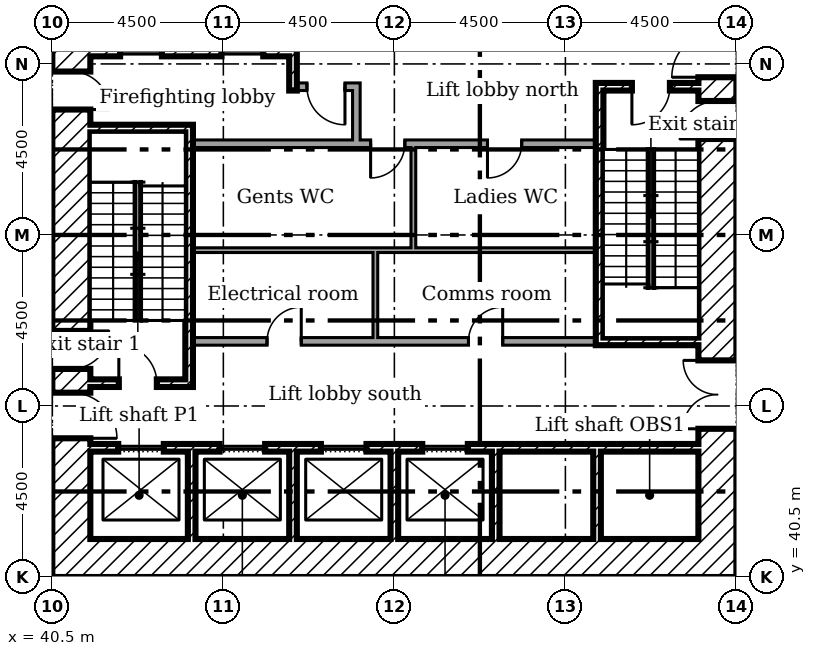
"""IFC4 building model, lengths in metres.
Left out: names, types, materials, properties, quantities, classifications, styles, units other than length and angle.
Written with IfcOpenShell. Run it as: python <this file> out.ifc"""

import sys

from ifc_helpers import new_model, si_unit, direction, frame, frame_2d, origin, place, context, subcontext, project, spatial, rectangle, extrude, element, fill, save


model = new_model("IFC4")
c1 = context("Model", 3, precision=1e-05, world=origin(), true_north=direction((0.0, 1.0)))
c2 = subcontext(c1, "Body", "Model", "MODEL_VIEW")
j1 = project(units=[si_unit("LENGTHUNIT", "METRE"), si_unit("PLANEANGLEUNIT", "RADIAN")], contexts=[c1])
p1 = place(None, origin())
s1 = spatial("IfcSite", under=j1, at=p1, CompositionType="ELEMENT")
p2 = place(p1, origin())
s2 = spatial("IfcBuilding", under=s1, at=p2, CompositionType="ELEMENT")
p3 = place(p2, frame((0.0, 0.0, 11.5)))
s3 = spatial("IfcBuildingStorey", under=s2, at=p3, CompositionType="ELEMENT", Elevation=11.5)
p4 = place(p3, frame((58.0, 40.5, 0.0), z_axis=(0.0, 0.0, 1.0), x_axis=(0.0, 1.0, 0.0)))
e1 = element("IfcWall", 1, at=p4, inside=s3, PredefinedType="SHEAR", context=c2, shape_type="SweptSolid", body=[
    extrude(rectangle(XDim=18.0, YDim=1.0, at=frame_2d((9.0, 0.0))), origin(), (0.0, 0.0, 1.0), 4.5),
])
p5 = place(p4, frame((13.15, 0.0, 0.0)))
e2 = element("IfcOpeningElement", 2, at=p5, cuts=e1, PredefinedType="OPENING", context=c2, shape_type="SweptSolid", body=[
    extrude(rectangle(XDim=1.2, YDim=2.1, at=frame_2d((0.6, 1.05))), frame((0.0, 0.51, 0.0), z_axis=(0.0, -1.0, 0.0), x_axis=(1.0, 0.0, 0.0)), (0.0, 0.0, 1.0), 1.02),
])
p6 = place(p4, frame((3.9, 0.0, 0.0)))
e3 = element("IfcOpeningElement", 3, at=p6, cuts=e1, PredefinedType="OPENING", context=c2, shape_type="SweptSolid", body=[
    extrude(rectangle(XDim=1.8, YDim=2.1, at=frame_2d((0.9, 1.05))), frame((0.0, 0.51, 0.0), z_axis=(0.0, -1.0, 0.0), x_axis=(1.0, 0.0, 0.0)), (0.0, 0.0, 1.0), 1.02),
])
p7 = place(p4, frame((11.525, 0.0, 0.0)))
e4 = element("IfcOpeningElement", 4, at=p7, cuts=e1, PredefinedType="OPENING", context=c2, shape_type="SweptSolid", body=[
    extrude(rectangle(XDim=1.0, YDim=2.1, at=frame_2d((0.5, 1.05))), frame((0.0, 0.51, 0.0), z_axis=(0.0, -1.0, 0.0), x_axis=(1.0, 0.0, 0.0)), (0.0, 0.0, 1.0), 1.02),
])
p8 = place(p3, frame((41.5, 41.0, 0.0)))
e5 = element("IfcWall", 5, at=p8, inside=s3, PredefinedType="SHEAR", context=c2, shape_type="SweptSolid", body=[
    extrude(rectangle(XDim=16.0, YDim=1.0, at=frame_2d((8.0, 0.0))), origin(), (0.0, 0.0, 1.0), 4.5),
])
p9 = place(p3, frame((41.0, 40.5, 0.0), z_axis=(0.0, 0.0, 1.0), x_axis=(0.0, 1.0, 0.0)))
e6 = element("IfcWall", 6, at=p9, inside=s3, PredefinedType="SHEAR", context=c2, shape_type="SweptSolid", body=[
    extrude(rectangle(XDim=18.0, YDim=1.0, at=frame_2d((9.0, 0.0))), origin(), (0.0, 0.0, 1.0), 4.5),
])
p10 = place(p9, frame((3.65, 0.0, 0.0)))
e7 = element("IfcOpeningElement", 7, at=p10, cuts=e6, PredefinedType="OPENING", context=c2, shape_type="SweptSolid", body=[
    extrude(rectangle(XDim=1.2, YDim=2.1, at=frame_2d((0.6, 1.05))), frame((0.0, 0.51, 0.0), z_axis=(0.0, -1.0, 0.0), x_axis=(1.0, 0.0, 0.0)), (0.0, 0.0, 1.0), 1.02),
])
p11 = place(p9, frame((5.475, 0.0, 0.0)))
e8 = element("IfcOpeningElement", 8, at=p11, cuts=e6, PredefinedType="OPENING", context=c2, shape_type="SweptSolid", body=[
    extrude(rectangle(XDim=1.0, YDim=2.1, at=frame_2d((0.5, 1.05))), frame((0.0, 0.51, 0.0), z_axis=(0.0, -1.0, 0.0), x_axis=(1.0, 0.0, 0.0)), (0.0, 0.0, 1.0), 1.02),
])
p12 = place(p9, frame((12.3, 0.0, 0.0)))
e9 = element("IfcOpeningElement", 9, at=p12, cuts=e6, PredefinedType="OPENING", context=c2, shape_type="SweptSolid", body=[
    extrude(rectangle(XDim=1.0, YDim=2.1, at=frame_2d((0.5, 1.05))), frame((0.0, 0.51, 0.0), z_axis=(0.0, -1.0, 0.0), x_axis=(1.0, 0.0, 0.0)), (0.0, 0.0, 1.0), 1.02),
])
p13 = place(p3, frame((46.833, 57.5, 0.0), z_axis=(0.0, 0.0, 1.0), x_axis=(0.0, -1.0, 0.0)))
e10 = element("IfcWall", 10, at=p13, inside=s3, PredefinedType="SHEAR", context=c2, shape_type="SweptSolid", body=[
    extrude(rectangle(XDim=4.2, YDim=0.2, at=frame_2d((2.1, 0.0))), origin(), (0.0, 0.0, 1.0), 4.5),
])
for number, where, z_axis, x_axis in (
    (11, (44.167, 41.5, 0.0), (0.0, 0.0, 1.0), (0.0, 1.0, 0.0)),
    (12, (46.833, 41.5, 0.0), (0.0, 0.0, 1.0), (0.0, 1.0, 0.0)),
    (13, (49.5, 41.5, 0.0), (0.0, 0.0, 1.0), (0.0, 1.0, 0.0)),
    (14, (52.167, 41.5, 0.0), (0.0, 0.0, 1.0), (0.0, 1.0, 0.0)),
    (15, (54.833, 41.5, 0.0), (0.0, 0.0, 1.0), (0.0, 1.0, 0.0)),
):
    element("IfcWall", number, at=place(p3, frame(where, z_axis=z_axis, x_axis=x_axis)), inside=s3, PredefinedType="SHEAR", context=c2, shape_type="SweptSolid", body=[
        extrude(rectangle(XDim=2.3, YDim=0.2, at=frame_2d((1.15, 0.0))), origin(), (0.0, 0.0, 1.0), 4.5),
    ])
p14 = place(p3, frame((48.5, 51.9, 0.0), z_axis=(0.0, 0.0, 1.0), x_axis=(0.0, 1.0, 0.0)))
e16 = element("IfcWall", 16, at=p14, inside=s3, PredefinedType="PARTITIONING", context=c2, shape_type="SweptSolid", body=[
    extrude(rectangle(XDim=1.6, YDim=0.2, at=frame_2d((0.8, 0.0))), origin(), (0.0, 0.0, 1.0), 4.5),
])
p15 = place(p3, frame((46.933, 53.4, 0.0)))
e17 = element("IfcWall", 17, at=p15, inside=s3, PredefinedType="PARTITIONING", context=c2, shape_type="SweptSolid", body=[
    extrude(rectangle(XDim=1.467, YDim=0.2, at=frame_2d((0.733, 0.0))), origin(), (0.0, 0.0, 1.0), 4.5),
])
p16 = place(p15, frame((0.267, 0.0, 0.0)))
e18 = element("IfcOpeningElement", 18, at=p16, cuts=e17, PredefinedType="OPENING", context=c2, shape_type="SweptSolid", body=[
    extrude(rectangle(XDim=1.0, YDim=2.1, at=frame_2d((0.5, 1.05))), frame((0.0, 0.11, 0.0), z_axis=(0.0, -1.0, 0.0), x_axis=(1.0, 0.0, 0.0)), (0.0, 0.0, 1.0), 0.22),
])
p17 = place(p3, frame((41.5, 54.3, 0.0)))
e19 = element("IfcWall", 19, at=p17, inside=s3, PredefinedType="SHEAR", context=c2, shape_type="SweptSolid", body=[
    extrude(rectangle(XDim=5.233, YDim=0.2, at=frame_2d((2.617, 0.0))), origin(), (0.0, 0.0, 1.0), 4.5),
])
p18 = place(p17, frame((0.783, 0.0, 0.0)))
e20 = element("IfcOpeningElement", 20, at=p18, cuts=e19, PredefinedType="OPENING", context=c2, shape_type="SweptSolid", body=[
    extrude(rectangle(XDim=1.1, YDim=2.1, at=frame_2d((0.55, 1.05))), frame((0.0, 0.11, 0.0), z_axis=(0.0, -1.0, 0.0), x_axis=(1.0, 0.0, 0.0)), (0.0, 0.0, 1.0), 0.22),
])
p19 = place(p17, frame((3.45, 0.0, 0.0)))
e21 = element("IfcOpeningElement", 21, at=p19, cuts=e19, PredefinedType="OPENING", context=c2, shape_type="SweptSolid", body=[
    extrude(rectangle(XDim=1.1, YDim=2.1, at=frame_2d((0.55, 1.05))), frame((0.0, 0.11, 0.0), z_axis=(0.0, -1.0, 0.0), x_axis=(1.0, 0.0, 0.0)), (0.0, 0.0, 1.0), 0.22),
])
p20 = place(p3, frame((41.5, 43.9, 0.0)))
e22 = element("IfcWall", 22, at=p20, inside=s3, PredefinedType="SHEAR", context=c2, shape_type="SweptSolid", body=[
    extrude(rectangle(XDim=16.0, YDim=0.2, at=frame_2d((8.0, 0.0))), origin(), (0.0, 0.0, 1.0), 4.5),
])
p21 = place(p20, frame((0.733, 0.0, 0.0)))
e23 = element("IfcOpeningElement", 23, at=p21, cuts=e22, PredefinedType="OPENING", context=c2, shape_type="SweptSolid", body=[
    extrude(rectangle(XDim=1.2, YDim=2.1, at=frame_2d((0.6, 1.05))), frame((0.0, 0.11, 0.0), z_axis=(0.0, -1.0, 0.0), x_axis=(1.0, 0.0, 0.0)), (0.0, 0.0, 1.0), 0.22),
])
p22 = place(p20, frame((3.4, 0.0, 0.0)))
e24 = element("IfcOpeningElement", 24, at=p22, cuts=e22, PredefinedType="OPENING", context=c2, shape_type="SweptSolid", body=[
    extrude(rectangle(XDim=1.2, YDim=2.1, at=frame_2d((0.6, 1.05))), frame((0.0, 0.11, 0.0), z_axis=(0.0, -1.0, 0.0), x_axis=(1.0, 0.0, 0.0)), (0.0, 0.0, 1.0), 0.22),
])
p23 = place(p20, frame((6.067, 0.0, 0.0)))
e25 = element("IfcOpeningElement", 25, at=p23, cuts=e22, PredefinedType="OPENING", context=c2, shape_type="SweptSolid", body=[
    extrude(rectangle(XDim=1.2, YDim=2.1, at=frame_2d((0.6, 1.05))), frame((0.0, 0.11, 0.0), z_axis=(0.0, -1.0, 0.0), x_axis=(1.0, 0.0, 0.0)), (0.0, 0.0, 1.0), 0.22),
])
p24 = place(p20, frame((8.733, 0.0, 0.0)))
e26 = element("IfcOpeningElement", 26, at=p24, cuts=e22, PredefinedType="OPENING", context=c2, shape_type="SweptSolid", body=[
    extrude(rectangle(XDim=1.2, YDim=2.1, at=frame_2d((0.6, 1.05))), frame((0.0, 0.11, 0.0), z_axis=(0.0, -1.0, 0.0), x_axis=(1.0, 0.0, 0.0)), (0.0, 0.0, 1.0), 0.22),
])
p25 = place(p3, frame((44.1, 45.5, 0.0), z_axis=(0.0, 0.0, 1.0), x_axis=(0.0, 1.0, 0.0)))
e27 = element("IfcWall", 27, at=p25, inside=s3, PredefinedType="SHEAR", context=c2, shape_type="SweptSolid", body=[
    extrude(rectangle(XDim=6.9, YDim=0.2, at=frame_2d((3.45, 0.0))), origin(), (0.0, 0.0, 1.0), 4.5),
])
p26 = place(p3, frame((41.5, 52.3, 0.0)))
e28 = element("IfcWall", 28, at=p26, inside=s3, PredefinedType="SHEAR", context=c2, shape_type="SweptSolid", body=[
    extrude(rectangle(XDim=2.5, YDim=0.2, at=frame_2d((1.25, 0.0))), origin(), (0.0, 0.0, 1.0), 4.5),
])
p27 = place(p3, frame((41.5, 45.6, 0.0)))
e29 = element("IfcWall", 29, at=p27, inside=s3, PredefinedType="SHEAR", context=c2, shape_type="SweptSolid", body=[
    extrude(rectangle(XDim=2.5, YDim=0.2, at=frame_2d((1.25, 0.0))), origin(), (0.0, 0.0, 1.0), 4.5),
])
p28 = place(p27, frame((0.75, 0.0, 0.0)))
e30 = element("IfcOpeningElement", 30, at=p28, cuts=e29, PredefinedType="OPENING", context=c2, shape_type="SweptSolid", body=[
    extrude(rectangle(XDim=1.0, YDim=2.1, at=frame_2d((0.5, 1.05))), frame((0.0, 0.11, 0.0), z_axis=(0.0, -1.0, 0.0), x_axis=(1.0, 0.0, 0.0)), (0.0, 0.0, 1.0), 0.22),
])
p29 = place(p3, frame((54.8, 53.4, 0.0)))
e31 = element("IfcWall", 31, at=p29, inside=s3, PredefinedType="SHEAR", context=c2, shape_type="SweptSolid", body=[
    extrude(rectangle(XDim=2.7, YDim=0.2, at=frame_2d((1.35, 0.0))), origin(), (0.0, 0.0, 1.0), 4.5),
])
p30 = place(p29, frame((0.95, 0.0, 0.0)))
e32 = element("IfcOpeningElement", 32, at=p30, cuts=e31, PredefinedType="OPENING", context=c2, shape_type="SweptSolid", body=[
    extrude(rectangle(XDim=1.0, YDim=2.1, at=frame_2d((0.5, 1.05))), frame((0.0, 0.11, 0.0), z_axis=(0.0, -1.0, 0.0), x_axis=(1.0, 0.0, 0.0)), (0.0, 0.0, 1.0), 0.22),
])
p31 = place(p3, frame((54.8, 46.7, 0.0)))
e33 = element("IfcWall", 33, at=p31, inside=s3, PredefinedType="SHEAR", context=c2, shape_type="SweptSolid", body=[
    extrude(rectangle(XDim=2.7, YDim=0.2, at=frame_2d((1.35, 0.0))), origin(), (0.0, 0.0, 1.0), 4.5),
])
p32 = place(p3, frame((54.9, 46.8, 0.0), z_axis=(0.0, 0.0, 1.0), x_axis=(0.0, 1.0, 0.0)))
e34 = element("IfcWall", 34, at=p32, inside=s3, PredefinedType="SHEAR", context=c2, shape_type="SweptSolid", body=[
    extrude(rectangle(XDim=6.5, YDim=0.2, at=frame_2d((3.25, 0.0))), origin(), (0.0, 0.0, 1.0), 4.5),
])
p33 = place(p3, frame((44.2, 51.9, 0.0)))
e35 = element("IfcWall", 35, at=p33, inside=s3, PredefinedType="PARTITIONING", context=c2, shape_type="SweptSolid", body=[
    extrude(rectangle(XDim=10.6, YDim=0.2, at=frame_2d((5.3, 0.0))), origin(), (0.0, 0.0, 1.0), 4.5),
])
p34 = place(p33, frame((4.675, 0.0, 0.0)))
e36 = element("IfcOpeningElement", 36, at=p34, cuts=e35, PredefinedType="OPENING", context=c2, shape_type="SweptSolid", body=[
    extrude(rectangle(XDim=0.9, YDim=2.1, at=frame_2d((0.45, 1.05))), frame((0.0, 0.11, 0.0), z_axis=(0.0, -1.0, 0.0), x_axis=(1.0, 0.0, 0.0)), (0.0, 0.0, 1.0), 0.22),
])
p35 = place(p33, frame((7.75, 0.0, 0.0)))
e37 = element("IfcOpeningElement", 37, at=p35, cuts=e35, PredefinedType="OPENING", context=c2, shape_type="SweptSolid", body=[
    extrude(rectangle(XDim=0.9, YDim=2.1, at=frame_2d((0.45, 1.05))), frame((0.0, 0.11, 0.0), z_axis=(0.0, -1.0, 0.0), x_axis=(1.0, 0.0, 0.0)), (0.0, 0.0, 1.0), 0.22),
])
p36 = place(p3, frame((44.2, 46.7, 0.0)))
e38 = element("IfcWall", 38, at=p36, inside=s3, PredefinedType="PARTITIONING", context=c2, shape_type="SweptSolid", body=[
    extrude(rectangle(XDim=10.6, YDim=0.2, at=frame_2d((5.3, 0.0))), origin(), (0.0, 0.0, 1.0), 4.5),
])
p37 = place(p36, frame((1.95, 0.0, 0.0)))
e39 = element("IfcOpeningElement", 39, at=p37, cuts=e38, PredefinedType="OPENING", context=c2, shape_type="SweptSolid", body=[
    extrude(rectangle(XDim=0.9, YDim=2.1, at=frame_2d((0.45, 1.05))), frame((0.0, 0.11, 0.0), z_axis=(0.0, -1.0, 0.0), x_axis=(1.0, 0.0, 0.0)), (0.0, 0.0, 1.0), 0.22),
])
p38 = place(p36, frame((7.25, 0.0, 0.0)))
e40 = element("IfcOpeningElement", 40, at=p38, cuts=e38, PredefinedType="OPENING", context=c2, shape_type="SweptSolid", body=[
    extrude(rectangle(XDim=0.9, YDim=2.1, at=frame_2d((0.45, 1.05))), frame((0.0, 0.11, 0.0), z_axis=(0.0, -1.0, 0.0), x_axis=(1.0, 0.0, 0.0)), (0.0, 0.0, 1.0), 0.22),
])
p39 = place(p3, frame((49.0, 46.8, 0.0), z_axis=(0.0, 0.0, 1.0), x_axis=(0.0, 1.0, 0.0)))
e41 = element("IfcWall", 41, at=p39, inside=s3, PredefinedType="PARTITIONING", context=c2, shape_type="SweptSolid", body=[
    extrude(rectangle(XDim=2.363, YDim=0.125, at=frame_2d((1.181, 0.0))), origin(), (0.0, 0.0, 1.0), 4.5),
])
p40 = place(p3, frame((48.938, 49.1, 0.0), z_axis=(0.0, 0.0, 1.0), x_axis=(-1.0, 0.0, 0.0)))
e42 = element("IfcWall", 42, at=p40, inside=s3, PredefinedType="PARTITIONING", context=c2, shape_type="SweptSolid", body=[
    extrude(rectangle(XDim=4.738, YDim=0.125, at=frame_2d((2.369, 0.0))), origin(), (0.0, 0.0, 1.0), 4.5),
])
p41 = place(p3, frame((50.062, 49.1, 0.0), z_axis=(0.0, 0.0, 1.0), x_axis=(-1.0, 0.0, 0.0)))
e43 = element("IfcWall", 43, at=p41, inside=s3, PredefinedType="PARTITIONING", context=c2, shape_type="SweptSolid", body=[
    extrude(rectangle(XDim=1.062, YDim=0.125, at=frame_2d((0.531, 0.0))), origin(), (0.0, 0.0, 1.0), 4.5),
])
p42 = place(p3, frame((54.8, 49.1, 0.0), z_axis=(0.0, 0.0, 1.0), x_axis=(-1.0, 0.0, 0.0)))
e44 = element("IfcWall", 44, at=p42, inside=s3, PredefinedType="PARTITIONING", context=c2, shape_type="SweptSolid", body=[
    extrude(rectangle(XDim=4.8, YDim=0.125, at=frame_2d((2.4, 0.0))), origin(), (0.0, 0.0, 1.0), 4.5),
])
p43 = place(p3, frame((50.0, 49.163, 0.0), z_axis=(0.0, 0.0, 1.0), x_axis=(0.0, 1.0, 0.0)))
e45 = element("IfcWall", 45, at=p43, inside=s3, PredefinedType="PARTITIONING", context=c2, shape_type="SweptSolid", body=[
    extrude(rectangle(XDim=2.637, YDim=0.125, at=frame_2d((1.319, 0.0))), origin(), (0.0, 0.0, 1.0), 4.5),
])
p44 = place(p5, origin())
e46 = element("IfcDoor", 46, at=p44, inside=s3, OperationType="SINGLE_SWING_RIGHT", PredefinedType="DOOR", context=c2, shape_type="SweptSolid", body=[
    extrude(rectangle(XDim=1.2, YDim=2.1, at=frame_2d((0.6, 1.05))), frame((0.0, 0.025, 0.0), z_axis=(0.0, -1.0, 0.0), x_axis=(1.0, 0.0, 0.0)), (0.0, 0.0, 1.0), 0.05),
])
fill(e2, e46)
p45 = place(p6, origin())
e47 = element("IfcDoor", 47, at=p45, inside=s3, OperationType="DOUBLE_DOOR_SINGLE_SWING", PredefinedType="DOOR", context=c2, shape_type="SweptSolid", body=[
    extrude(rectangle(XDim=1.8, YDim=2.1, at=frame_2d((0.9, 1.05))), frame((0.0, 0.025, 0.0), z_axis=(0.0, -1.0, 0.0), x_axis=(1.0, 0.0, 0.0)), (0.0, 0.0, 1.0), 0.05),
])
fill(e3, e47)
p46 = place(p10, frame((1.2, 0.0, 0.0), x_axis=(-1.0, 0.0, 0.0)))
e48 = element("IfcDoor", 48, at=p46, inside=s3, OperationType="SINGLE_SWING_LEFT", PredefinedType="DOOR", context=c2, shape_type="SweptSolid", body=[
    extrude(rectangle(XDim=1.2, YDim=2.1, at=frame_2d((0.6, 1.05))), frame((0.0, 0.025, 0.0), z_axis=(0.0, -1.0, 0.0), x_axis=(1.0, 0.0, 0.0)), (0.0, 0.0, 1.0), 0.05),
])
fill(e7, e48)
p47 = place(p28, origin())
e49 = element("IfcDoor", 49, at=p47, inside=s3, OperationType="SINGLE_SWING_RIGHT", PredefinedType="DOOR", context=c2, shape_type="SweptSolid", body=[
    extrude(rectangle(XDim=1.0, YDim=2.1, at=frame_2d((0.5, 1.05))), frame((0.0, 0.025, 0.0), z_axis=(0.0, -1.0, 0.0), x_axis=(1.0, 0.0, 0.0)), (0.0, 0.0, 1.0), 0.05),
])
fill(e30, e49)
p48 = place(p11, frame((1.0, 0.0, 0.0), x_axis=(-1.0, 0.0, 0.0)))
e50 = element("IfcDoor", 50, at=p48, inside=s3, OperationType="SINGLE_SWING_RIGHT", PredefinedType="DOOR", context=c2, shape_type="SweptSolid", body=[
    extrude(rectangle(XDim=1.0, YDim=2.1, at=frame_2d((0.5, 1.05))), frame((0.0, 0.025, 0.0), z_axis=(0.0, -1.0, 0.0), x_axis=(1.0, 0.0, 0.0)), (0.0, 0.0, 1.0), 0.05),
])
fill(e8, e50)
p49 = place(p30, frame((1.0, 0.0, 0.0), x_axis=(-1.0, 0.0, 0.0)))
e51 = element("IfcDoor", 51, at=p49, inside=s3, OperationType="SINGLE_SWING_LEFT", PredefinedType="DOOR", context=c2, shape_type="SweptSolid", body=[
    extrude(rectangle(XDim=1.0, YDim=2.1, at=frame_2d((0.5, 1.05))), frame((0.0, 0.025, 0.0), z_axis=(0.0, -1.0, 0.0), x_axis=(1.0, 0.0, 0.0)), (0.0, 0.0, 1.0), 0.05),
])
fill(e32, e51)
p50 = place(p7, origin())
e52 = element("IfcDoor", 52, at=p50, inside=s3, OperationType="SINGLE_SWING_RIGHT", PredefinedType="DOOR", context=c2, shape_type="SweptSolid", body=[
    extrude(rectangle(XDim=1.0, YDim=2.1, at=frame_2d((0.5, 1.05))), frame((0.0, 0.025, 0.0), z_axis=(0.0, -1.0, 0.0), x_axis=(1.0, 0.0, 0.0)), (0.0, 0.0, 1.0), 0.05),
])
fill(e4, e52)
p51 = place(p16, frame((1.0, 0.0, 0.0), x_axis=(-1.0, 0.0, 0.0)))
e53 = element("IfcDoor", 53, at=p51, inside=s3, OperationType="SINGLE_SWING_RIGHT", PredefinedType="DOOR", context=c2, shape_type="SweptSolid", body=[
    extrude(rectangle(XDim=1.0, YDim=2.1, at=frame_2d((0.5, 1.05))), frame((0.0, 0.025, 0.0), z_axis=(0.0, -1.0, 0.0), x_axis=(1.0, 0.0, 0.0)), (0.0, 0.0, 1.0), 0.05),
])
fill(e18, e53)
p52 = place(p12, frame((1.0, 0.0, 0.0), x_axis=(-1.0, 0.0, 0.0)))
e54 = element("IfcDoor", 54, at=p52, inside=s3, OperationType="SINGLE_SWING_LEFT", PredefinedType="DOOR", context=c2, shape_type="SweptSolid", body=[
    extrude(rectangle(XDim=1.0, YDim=2.1, at=frame_2d((0.5, 1.05))), frame((0.0, 0.025, 0.0), z_axis=(0.0, -1.0, 0.0), x_axis=(1.0, 0.0, 0.0)), (0.0, 0.0, 1.0), 0.05),
])
fill(e9, e54)
p53 = place(p37, origin())
e55 = element("IfcDoor", 55, at=p53, inside=s3, OperationType="SINGLE_SWING_LEFT", PredefinedType="DOOR", context=c2, shape_type="SweptSolid", body=[
    extrude(rectangle(XDim=0.9, YDim=2.1, at=frame_2d((0.45, 1.05))), frame((0.0, 0.025, 0.0), z_axis=(0.0, -1.0, 0.0), x_axis=(1.0, 0.0, 0.0)), (0.0, 0.0, 1.0), 0.05),
])
fill(e39, e55)
p54 = place(p38, origin())
e56 = element("IfcDoor", 56, at=p54, inside=s3, OperationType="SINGLE_SWING_LEFT", PredefinedType="DOOR", context=c2, shape_type="SweptSolid", body=[
    extrude(rectangle(XDim=0.9, YDim=2.1, at=frame_2d((0.45, 1.05))), frame((0.0, 0.025, 0.0), z_axis=(0.0, -1.0, 0.0), x_axis=(1.0, 0.0, 0.0)), (0.0, 0.0, 1.0), 0.05),
])
fill(e40, e56)
p55 = place(p34, frame((0.9, 0.0, 0.0), x_axis=(-1.0, 0.0, 0.0)))
e57 = element("IfcDoor", 57, at=p55, inside=s3, OperationType="SINGLE_SWING_LEFT", PredefinedType="DOOR", context=c2, shape_type="SweptSolid", body=[
    extrude(rectangle(XDim=0.9, YDim=2.1, at=frame_2d((0.45, 1.05))), frame((0.0, 0.025, 0.0), z_axis=(0.0, -1.0, 0.0), x_axis=(1.0, 0.0, 0.0)), (0.0, 0.0, 1.0), 0.05),
])
fill(e36, e57)
p56 = place(p35, frame((0.9, 0.0, 0.0), x_axis=(-1.0, 0.0, 0.0)))
e58 = element("IfcDoor", 58, at=p56, inside=s3, OperationType="SINGLE_SWING_LEFT", PredefinedType="DOOR", context=c2, shape_type="SweptSolid", body=[
    extrude(rectangle(XDim=0.9, YDim=2.1, at=frame_2d((0.45, 1.05))), frame((0.0, 0.025, 0.0), z_axis=(0.0, -1.0, 0.0), x_axis=(1.0, 0.0, 0.0)), (0.0, 0.0, 1.0), 0.05),
])
fill(e37, e58)
p57 = place(p18, origin())
e59 = element("IfcDoor", 59, at=p57, inside=s3, OperationType="SLIDING_TO_LEFT", PredefinedType="DOOR", context=c2, shape_type="SweptSolid", body=[
    extrude(rectangle(XDim=1.1, YDim=2.1, at=frame_2d((0.55, 1.05))), frame((0.0, 0.025, 0.0), z_axis=(0.0, -1.0, 0.0), x_axis=(1.0, 0.0, 0.0)), (0.0, 0.0, 1.0), 0.05),
])
fill(e20, e59)
p58 = place(p19, origin())
e60 = element("IfcDoor", 60, at=p58, inside=s3, OperationType="SLIDING_TO_LEFT", PredefinedType="DOOR", context=c2, shape_type="SweptSolid", body=[
    extrude(rectangle(XDim=1.1, YDim=2.1, at=frame_2d((0.55, 1.05))), frame((0.0, 0.025, 0.0), z_axis=(0.0, -1.0, 0.0), x_axis=(1.0, 0.0, 0.0)), (0.0, 0.0, 1.0), 0.05),
])
fill(e21, e60)
p59 = place(p21, origin())
e61 = element("IfcDoor", 61, at=p59, inside=s3, OperationType="SLIDING_TO_LEFT", PredefinedType="DOOR", context=c2, shape_type="SweptSolid", body=[
    extrude(rectangle(XDim=1.2, YDim=2.1, at=frame_2d((0.6, 1.05))), frame((0.0, 0.025, 0.0), z_axis=(0.0, -1.0, 0.0), x_axis=(1.0, 0.0, 0.0)), (0.0, 0.0, 1.0), 0.05),
])
fill(e23, e61)
p60 = place(p22, origin())
e62 = element("IfcDoor", 62, at=p60, inside=s3, OperationType="SLIDING_TO_LEFT", PredefinedType="DOOR", context=c2, shape_type="SweptSolid", body=[
    extrude(rectangle(XDim=1.2, YDim=2.1, at=frame_2d((0.6, 1.05))), frame((0.0, 0.025, 0.0), z_axis=(0.0, -1.0, 0.0), x_axis=(1.0, 0.0, 0.0)), (0.0, 0.0, 1.0), 0.05),
])
fill(e24, e62)
p61 = place(p23, origin())
e63 = element("IfcDoor", 63, at=p61, inside=s3, OperationType="SLIDING_TO_LEFT", PredefinedType="DOOR", context=c2, shape_type="SweptSolid", body=[
    extrude(rectangle(XDim=1.2, YDim=2.1, at=frame_2d((0.6, 1.05))), frame((0.0, 0.025, 0.0), z_axis=(0.0, -1.0, 0.0), x_axis=(1.0, 0.0, 0.0)), (0.0, 0.0, 1.0), 0.05),
])
fill(e25, e63)
p62 = place(p24, origin())
e64 = element("IfcDoor", 64, at=p62, inside=s3, OperationType="SLIDING_TO_LEFT", PredefinedType="DOOR", context=c2, shape_type="SweptSolid", body=[
    extrude(rectangle(XDim=1.2, YDim=2.1, at=frame_2d((0.6, 1.05))), frame((0.0, 0.025, 0.0), z_axis=(0.0, -1.0, 0.0), x_axis=(1.0, 0.0, 0.0)), (0.0, 0.0, 1.0), 0.05),
])
fill(e26, e64)
save(model, sys.argv[1])
